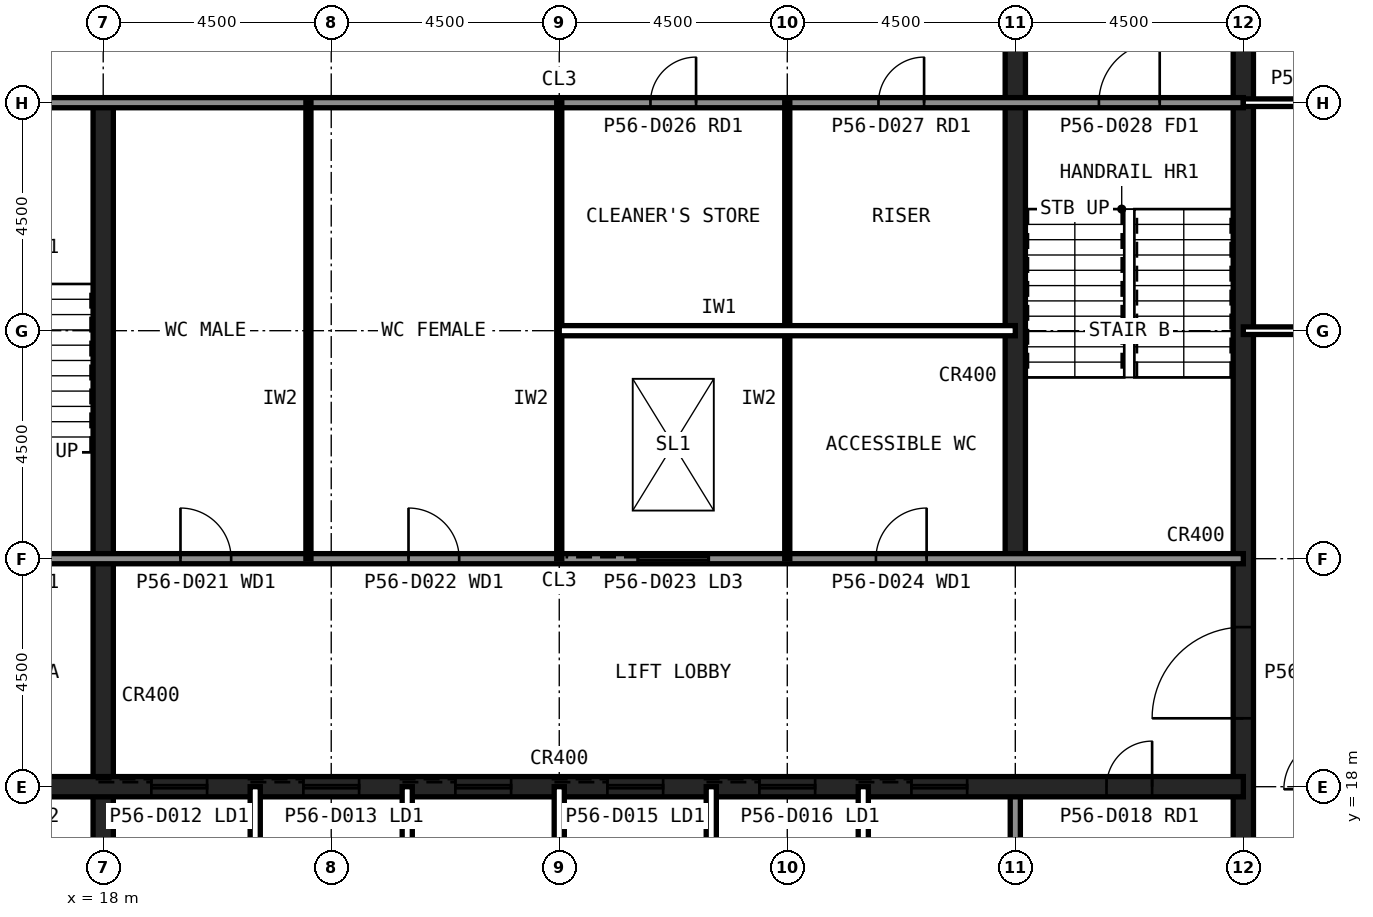
"""IFC4 building model, lengths in metres.
Left out: names, types, materials, properties, quantities, classifications, styles, units other than length and angle.
Written with IfcOpenShell. Run it as: python <this file> out.ifc"""

import sys

from ifc_helpers import new_model, si_unit, direction, frame, frame_2d, origin, place, context, subcontext, project, spatial, rectangle, extrude, element, fill, save


model = new_model("IFC4")
c1 = context("Model", 3, precision=1e-05, world=origin(), true_north=direction((0.0, 1.0)))
c2 = subcontext(c1, "Body", "Model", "MODEL_VIEW")
j1 = project(units=[si_unit("LENGTHUNIT", "METRE"), si_unit("PLANEANGLEUNIT", "RADIAN")], contexts=[c1])
p1 = place(None, origin())
s1 = spatial("IfcSite", under=j1, at=p1, CompositionType="ELEMENT")
p2 = place(p1, origin())
s2 = spatial("IfcBuilding", under=s1, at=p2, CompositionType="ELEMENT")
p3 = place(p2, frame((0.0, 0.0, 238.6)))
s3 = spatial("IfcBuildingStorey", under=s2, at=p3, CompositionType="ELEMENT", Elevation=238.6)
p4 = place(p3, frame((40.5, 13.5, 0.0), z_axis=(0.0, 0.0, 1.0), x_axis=(0.0, 1.0, 0.0)))
e1 = element("IfcWall", 1, at=p4, inside=s3, PredefinedType="SHEAR", context=c2, shape_type="SweptSolid", body=[
    extrude(rectangle(XDim=27.0, YDim=0.4, at=frame_2d((13.5, 0.0))), origin(), (0.0, 0.0, 1.0), 4.0),
])
p5 = place(p4, frame((5.85, 0.0, 0.0)))
e2 = element("IfcOpeningElement", 2, at=p5, cuts=e1, PredefinedType="OPENING", context=c2, shape_type="SweptSolid", body=[
    extrude(rectangle(XDim=1.8, YDim=2.1, at=frame_2d((0.9, 1.05))), frame((0.0, 0.21, 0.0), z_axis=(0.0, -1.0, 0.0), x_axis=(1.0, 0.0, 0.0)), (0.0, 0.0, 1.0), 0.42),
])
p6 = place(p4, frame((19.65, 0.0, 0.0)))
e3 = element("IfcOpeningElement", 3, at=p6, cuts=e1, PredefinedType="OPENING", context=c2, shape_type="SweptSolid", body=[
    extrude(rectangle(XDim=1.2, YDim=2.1, at=frame_2d((0.6, 1.05))), frame((0.0, 0.21, 0.0), z_axis=(0.0, -1.0, 0.0), x_axis=(1.0, 0.0, 0.0)), (0.0, 0.0, 1.0), 0.42),
])
p7 = place(p3, frame((18.0, 13.5, 0.0), z_axis=(0.0, 0.0, 1.0), x_axis=(0.0, 1.0, 0.0)))
e4 = element("IfcWall", 4, at=p7, inside=s3, PredefinedType="SHEAR", context=c2, shape_type="SweptSolid", body=[
    extrude(rectangle(XDim=18.0, YDim=0.4, at=frame_2d((9.0, 0.0))), origin(), (0.0, 0.0, 1.0), 4.0),
])
p8 = place(p3, frame((36.0, 13.5, 0.0), z_axis=(0.0, 0.0, 1.0), x_axis=(0.0, 1.0, 0.0)))
e5 = element("IfcWall", 5, at=p8, inside=s3, PredefinedType="SOLIDWALL", context=c2, shape_type="SweptSolid", body=[
    extrude(rectangle(XDim=4.5, YDim=0.2, at=frame_2d((2.25, 0.0))), origin(), (0.0, 0.0, 1.0), 3.84),
])
p9 = place(p3, frame((36.0, 22.5, 0.0), z_axis=(0.0, 0.0, 1.0), x_axis=(0.0, 1.0, 0.0)))
e6 = element("IfcWall", 6, at=p9, inside=s3, PredefinedType="SHEAR", context=c2, shape_type="SweptSolid", body=[
    extrude(rectangle(XDim=18.0, YDim=0.4, at=frame_2d((9.0, 0.0))), origin(), (0.0, 0.0, 1.0), 4.0),
])
p10 = place(p3, frame((13.5, 18.0, 0.0), z_axis=(0.0, 0.0, 1.0), x_axis=(1.0, 0.0, 0.0)))
e7 = element("IfcWall", 7, at=p10, inside=s3, PredefinedType="SHEAR", context=c2, shape_type="SweptSolid", body=[
    extrude(rectangle(XDim=27.0, YDim=0.4, at=frame_2d((13.5, 0.0))), origin(), (0.0, 0.0, 1.0), 4.0),
])
p11 = place(p10, frame((24.3, 0.0, 0.0)))
e8 = element("IfcOpeningElement", 8, at=p11, cuts=e7, PredefinedType="OPENING", context=c2, shape_type="SweptSolid", body=[
    extrude(rectangle(XDim=0.9, YDim=2.1, at=frame_2d((0.45, 1.05))), frame((0.0, 0.21, 0.0), z_axis=(0.0, -1.0, 0.0), x_axis=(1.0, 0.0, 0.0)), (0.0, 0.0, 1.0), 0.42),
])
p12 = place(p10, frame((5.45, 0.0, 0.0)))
e9 = element("IfcOpeningElement", 9, at=p12, cuts=e7, PredefinedType="OPENING", context=c2, shape_type="SweptSolid", body=[
    extrude(rectangle(XDim=1.1, YDim=2.1, at=frame_2d((0.55, 1.05))), frame((0.0, 0.21, 0.0), z_axis=(0.0, -1.0, 0.0), x_axis=(1.0, 0.0, 0.0)), (0.0, 0.0, 1.0), 0.42),
])
p13 = place(p10, frame((8.45, 0.0, 0.0)))
e10 = element("IfcOpeningElement", 10, at=p13, cuts=e7, PredefinedType="OPENING", context=c2, shape_type="SweptSolid", body=[
    extrude(rectangle(XDim=1.1, YDim=2.1, at=frame_2d((0.55, 1.05))), frame((0.0, 0.21, 0.0), z_axis=(0.0, -1.0, 0.0), x_axis=(1.0, 0.0, 0.0)), (0.0, 0.0, 1.0), 0.42),
])
p14 = place(p10, frame((11.45, 0.0, 0.0)))
e11 = element("IfcOpeningElement", 11, at=p14, cuts=e7, PredefinedType="OPENING", context=c2, shape_type="SweptSolid", body=[
    extrude(rectangle(XDim=1.1, YDim=2.1, at=frame_2d((0.55, 1.05))), frame((0.0, 0.21, 0.0), z_axis=(0.0, -1.0, 0.0), x_axis=(1.0, 0.0, 0.0)), (0.0, 0.0, 1.0), 0.42),
])
p15 = place(p10, frame((14.45, 0.0, 0.0)))
e12 = element("IfcOpeningElement", 12, at=p15, cuts=e7, PredefinedType="OPENING", context=c2, shape_type="SweptSolid", body=[
    extrude(rectangle(XDim=1.1, YDim=2.1, at=frame_2d((0.55, 1.05))), frame((0.0, 0.21, 0.0), z_axis=(0.0, -1.0, 0.0), x_axis=(1.0, 0.0, 0.0)), (0.0, 0.0, 1.0), 0.42),
])
p16 = place(p10, frame((17.45, 0.0, 0.0)))
e13 = element("IfcOpeningElement", 13, at=p16, cuts=e7, PredefinedType="OPENING", context=c2, shape_type="SweptSolid", body=[
    extrude(rectangle(XDim=1.1, YDim=2.1, at=frame_2d((0.55, 1.05))), frame((0.0, 0.21, 0.0), z_axis=(0.0, -1.0, 0.0), x_axis=(1.0, 0.0, 0.0)), (0.0, 0.0, 1.0), 0.42),
])
p17 = place(p10, frame((20.45, 0.0, 0.0)))
e14 = element("IfcOpeningElement", 14, at=p17, cuts=e7, PredefinedType="OPENING", context=c2, shape_type="SweptSolid", body=[
    extrude(rectangle(XDim=1.1, YDim=2.1, at=frame_2d((0.55, 1.05))), frame((0.0, 0.21, 0.0), z_axis=(0.0, -1.0, 0.0), x_axis=(1.0, 0.0, 0.0)), (0.0, 0.0, 1.0), 0.42),
])
p18 = place(p10, frame((1.6, 0.0, 0.0)))
e15 = element("IfcOpeningElement", 15, at=p18, cuts=e7, PredefinedType="OPENING", context=c2, shape_type="SweptSolid", body=[
    extrude(rectangle(XDim=1.3, YDim=2.2, at=frame_2d((0.65, 1.1))), frame((0.0, 0.21, 0.0), z_axis=(0.0, -1.0, 0.0), x_axis=(1.0, 0.0, 0.0)), (0.0, 0.0, 1.0), 0.42),
])
p19 = place(p3, frame((13.5, 22.5, 0.0), z_axis=(0.0, 0.0, 1.0), x_axis=(1.0, 0.0, 0.0)))
e16 = element("IfcWall", 16, at=p19, inside=s3, PredefinedType="SOLIDWALL", context=c2, shape_type="SweptSolid", body=[
    extrude(rectangle(XDim=27.0, YDim=0.2, at=frame_2d((13.5, 0.0))), origin(), (0.0, 0.0, 1.0), 3.84),
])
p20 = place(p19, frame((1.65, 0.0, 0.0)))
e17 = element("IfcOpeningElement", 17, at=p20, cuts=e16, PredefinedType="OPENING", context=c2, shape_type="SweptSolid", body=[
    extrude(rectangle(XDim=1.2, YDim=2.1, at=frame_2d((0.6, 1.05))), frame((0.0, 0.11, 0.0), z_axis=(0.0, -1.0, 0.0), x_axis=(1.0, 0.0, 0.0)), (0.0, 0.0, 1.0), 0.22),
])
p21 = place(p19, frame((6.025, 0.0, 0.0)))
e18 = element("IfcOpeningElement", 18, at=p21, cuts=e16, PredefinedType="OPENING", context=c2, shape_type="SweptSolid", body=[
    extrude(rectangle(XDim=1.0, YDim=2.1, at=frame_2d((0.5, 1.05))), frame((0.0, 0.11, 0.0), z_axis=(0.0, -1.0, 0.0), x_axis=(1.0, 0.0, 0.0)), (0.0, 0.0, 1.0), 0.22),
])
p22 = place(p19, frame((10.525, 0.0, 0.0)))
e19 = element("IfcOpeningElement", 19, at=p22, cuts=e16, PredefinedType="OPENING", context=c2, shape_type="SweptSolid", body=[
    extrude(rectangle(XDim=1.0, YDim=2.1, at=frame_2d((0.5, 1.05))), frame((0.0, 0.11, 0.0), z_axis=(0.0, -1.0, 0.0), x_axis=(1.0, 0.0, 0.0)), (0.0, 0.0, 1.0), 0.22),
])
p23 = place(p19, frame((19.75, 0.0, 0.0)))
e20 = element("IfcOpeningElement", 20, at=p23, cuts=e16, PredefinedType="OPENING", context=c2, shape_type="SweptSolid", body=[
    extrude(rectangle(XDim=1.0, YDim=2.1, at=frame_2d((0.5, 1.05))), frame((0.0, 0.11, 0.0), z_axis=(0.0, -1.0, 0.0), x_axis=(1.0, 0.0, 0.0)), (0.0, 0.0, 1.0), 0.22),
])
p24 = place(p19, frame((15.05, 0.0, 0.0)))
e21 = element("IfcOpeningElement", 21, at=p24, cuts=e16, PredefinedType="OPENING", context=c2, shape_type="SweptSolid", body=[
    extrude(rectangle(XDim=1.4, YDim=2.4, at=frame_2d((0.7, 1.2))), frame((0.0, 0.11, 0.0), z_axis=(0.0, -1.0, 0.0), x_axis=(1.0, 0.0, 0.0)), (0.0, 0.0, 1.0), 0.22),
])
p25 = place(p3, frame((13.5, 31.5, 0.0), z_axis=(0.0, 0.0, 1.0), x_axis=(1.0, 0.0, 0.0)))
e22 = element("IfcWall", 22, at=p25, inside=s3, PredefinedType="SOLIDWALL", context=c2, shape_type="SweptSolid", body=[
    extrude(rectangle(XDim=27.0, YDim=0.2, at=frame_2d((13.5, 0.0))), origin(), (0.0, 0.0, 1.0), 3.84),
])
p26 = place(p25, frame((24.15, 0.0, 0.0)))
e23 = element("IfcOpeningElement", 23, at=p26, cuts=e22, PredefinedType="OPENING", context=c2, shape_type="SweptSolid", body=[
    extrude(rectangle(XDim=1.2, YDim=2.1, at=frame_2d((0.6, 1.05))), frame((0.0, 0.11, 0.0), z_axis=(0.0, -1.0, 0.0), x_axis=(1.0, 0.0, 0.0)), (0.0, 0.0, 1.0), 0.22),
])
p27 = place(p25, frame((15.3, 0.0, 0.0)))
e24 = element("IfcOpeningElement", 24, at=p27, cuts=e22, PredefinedType="OPENING", context=c2, shape_type="SweptSolid", body=[
    extrude(rectangle(XDim=0.9, YDim=2.1, at=frame_2d((0.45, 1.05))), frame((0.0, 0.11, 0.0), z_axis=(0.0, -1.0, 0.0), x_axis=(1.0, 0.0, 0.0)), (0.0, 0.0, 1.0), 0.22),
])
p28 = place(p25, frame((19.8, 0.0, 0.0)))
e25 = element("IfcOpeningElement", 25, at=p28, cuts=e22, PredefinedType="OPENING", context=c2, shape_type="SweptSolid", body=[
    extrude(rectangle(XDim=0.9, YDim=2.1, at=frame_2d((0.45, 1.05))), frame((0.0, 0.11, 0.0), z_axis=(0.0, -1.0, 0.0), x_axis=(1.0, 0.0, 0.0)), (0.0, 0.0, 1.0), 0.22),
])
for number, where, z_axis, x_axis in (
    (26, (21.0, 13.5, 0.0), (0.0, 0.0, 1.0), (0.0, 1.0, 0.0)),
    (27, (24.0, 13.5, 0.0), (0.0, 0.0, 1.0), (0.0, 1.0, 0.0)),
    (28, (27.0, 13.5, 0.0), (0.0, 0.0, 1.0), (0.0, 1.0, 0.0)),
    (29, (30.0, 13.5, 0.0), (0.0, 0.0, 1.0), (0.0, 1.0, 0.0)),
    (30, (33.0, 13.5, 0.0), (0.0, 0.0, 1.0), (0.0, 1.0, 0.0)),
):
    element("IfcWall", number, at=place(p3, frame(where, z_axis=z_axis, x_axis=x_axis)), inside=s3, PredefinedType="PARTITIONING", context=c2, shape_type="SweptSolid", body=[
        extrude(rectangle(XDim=4.5, YDim=0.2, at=frame_2d((2.25, 0.0))), origin(), (0.0, 0.0, 1.0), 3.84),
    ])
for number, where, z_axis, x_axis in (
    (31, (22.05, 22.5, 0.0), (0.0, 0.0, 1.0), (0.0, 1.0, 0.0)),
    (32, (27.0, 22.5, 0.0), (0.0, 0.0, 1.0), (0.0, 1.0, 0.0)),
    (33, (31.5, 22.5, 0.0), (0.0, 0.0, 1.0), (0.0, 1.0, 0.0)),
):
    element("IfcWall", number, at=place(p3, frame(where, z_axis=z_axis, x_axis=x_axis)), inside=s3, PredefinedType="PLUMBINGWALL", context=c2, shape_type="SweptSolid", body=[
        extrude(rectangle(XDim=9.0, YDim=0.1, at=frame_2d((4.5, 0.0))), origin(), (0.0, 0.0, 1.0), 3.84),
    ])
p29 = place(p3, frame((27.0, 27.0, 0.0), z_axis=(0.0, 0.0, 1.0), x_axis=(1.0, 0.0, 0.0)))
e34 = element("IfcWall", 34, at=p29, inside=s3, PredefinedType="PARTITIONING", context=c2, shape_type="SweptSolid", body=[
    extrude(rectangle(XDim=9.0, YDim=0.2, at=frame_2d((4.5, 0.0))), origin(), (0.0, 0.0, 1.0), 3.84),
])
p30 = place(p3, frame((40.5, 27.0, 0.0), z_axis=(0.0, 0.0, 1.0), x_axis=(1.0, 0.0, 0.0)))
e35 = element("IfcWall", 35, at=p30, inside=s3, PredefinedType="PARTITIONING", context=c2, shape_type="SweptSolid", body=[
    extrude(rectangle(XDim=13.165, YDim=0.15, at=frame_2d((6.583, 0.0))), origin(), (0.0, 0.0, 1.0), 2.989),
])
p31 = place(p3, frame((44.1, 31.5, 0.0), z_axis=(0.0, 0.0, 1.0), x_axis=(-1.0, 0.0, 0.0)))
e36 = element("IfcWall", 36, at=p31, inside=s3, PredefinedType="PARTITIONING", context=c2, shape_type="SweptSolid", body=[
    extrude(rectangle(XDim=3.6, YDim=0.15, at=frame_2d((1.8, 0.0))), origin(), (0.0, 0.0, 1.0), 2.989),
])
p32 = place(p31, frame((1.3, 0.0, 0.0)))
e37 = element("IfcOpeningElement", 37, at=p32, cuts=e36, PredefinedType="OPENING", context=c2, shape_type="SweptSolid", body=[
    extrude(rectangle(XDim=1.0, YDim=2.1, at=frame_2d((0.5, 1.05))), frame((0.0, 0.085, 0.0), z_axis=(0.0, -1.0, 0.0), x_axis=(1.0, 0.0, 0.0)), (0.0, 0.0, 1.0), 0.17),
])
p33 = place(p5, origin())
e38 = element("IfcDoor", 38, at=p33, inside=s3, OperationType="SINGLE_SWING_LEFT", PredefinedType="DOOR", context=c2, shape_type="SweptSolid", body=[
    extrude(rectangle(XDim=1.8, YDim=2.1, at=frame_2d((0.9, 1.05))), frame((0.0, 0.025, 0.0), z_axis=(0.0, -1.0, 0.0), x_axis=(1.0, 0.0, 0.0)), (0.0, 0.0, 1.0), 0.05),
])
fill(e2, e38)
p34 = place(p26, origin())
e39 = element("IfcDoor", 39, at=p34, inside=s3, OperationType="SINGLE_SWING_RIGHT", PredefinedType="DOOR", context=c2, shape_type="SweptSolid", body=[
    extrude(rectangle(XDim=1.2, YDim=2.1, at=frame_2d((0.6, 1.05))), frame((0.0, 0.025, 0.0), z_axis=(0.0, -1.0, 0.0), x_axis=(1.0, 0.0, 0.0)), (0.0, 0.0, 1.0), 0.05),
])
fill(e23, e39)
p35 = place(p21, origin())
e40 = element("IfcDoor", 40, at=p35, inside=s3, OperationType="SINGLE_SWING_LEFT", PredefinedType="DOOR", context=c2, shape_type="SweptSolid", body=[
    extrude(rectangle(XDim=1.0, YDim=2.1, at=frame_2d((0.5, 1.05))), frame((0.0, 0.025, 0.0), z_axis=(0.0, -1.0, 0.0), x_axis=(1.0, 0.0, 0.0)), (0.0, 0.0, 1.0), 0.05),
])
fill(e18, e40)
p36 = place(p22, origin())
e41 = element("IfcDoor", 41, at=p36, inside=s3, OperationType="SINGLE_SWING_LEFT", PredefinedType="DOOR", context=c2, shape_type="SweptSolid", body=[
    extrude(rectangle(XDim=1.0, YDim=2.1, at=frame_2d((0.5, 1.05))), frame((0.0, 0.025, 0.0), z_axis=(0.0, -1.0, 0.0), x_axis=(1.0, 0.0, 0.0)), (0.0, 0.0, 1.0), 0.05),
])
fill(e19, e41)
p37 = place(p23, origin())
e42 = element("IfcDoor", 42, at=p37, inside=s3, OperationType="SINGLE_SWING_RIGHT", PredefinedType="DOOR", context=c2, shape_type="SweptSolid", body=[
    extrude(rectangle(XDim=1.0, YDim=2.1, at=frame_2d((0.5, 1.05))), frame((0.0, 0.025, 0.0), z_axis=(0.0, -1.0, 0.0), x_axis=(1.0, 0.0, 0.0)), (0.0, 0.0, 1.0), 0.05),
])
fill(e20, e42)
p38 = place(p27, origin())
e43 = element("IfcDoor", 43, at=p38, inside=s3, OperationType="SINGLE_SWING_RIGHT", PredefinedType="DOOR", context=c2, shape_type="SweptSolid", body=[
    extrude(rectangle(XDim=0.9, YDim=2.1, at=frame_2d((0.45, 1.05))), frame((0.0, 0.025, 0.0), z_axis=(0.0, -1.0, 0.0), x_axis=(1.0, 0.0, 0.0)), (0.0, 0.0, 1.0), 0.05),
])
fill(e24, e43)
p39 = place(p28, origin())
e44 = element("IfcDoor", 44, at=p39, inside=s3, OperationType="SINGLE_SWING_RIGHT", PredefinedType="DOOR", context=c2, shape_type="SweptSolid", body=[
    extrude(rectangle(XDim=0.9, YDim=2.1, at=frame_2d((0.45, 1.05))), frame((0.0, 0.025, 0.0), z_axis=(0.0, -1.0, 0.0), x_axis=(1.0, 0.0, 0.0)), (0.0, 0.0, 1.0), 0.05),
])
fill(e25, e44)
p40 = place(p11, origin())
e45 = element("IfcDoor", 45, at=p40, inside=s3, OperationType="SINGLE_SWING_RIGHT", PredefinedType="DOOR", context=c2, shape_type="SweptSolid", body=[
    extrude(rectangle(XDim=0.9, YDim=2.1, at=frame_2d((0.45, 1.05))), frame((0.0, 0.025, 0.0), z_axis=(0.0, -1.0, 0.0), x_axis=(1.0, 0.0, 0.0)), (0.0, 0.0, 1.0), 0.05),
])
fill(e8, e45)
p41 = place(p12, origin())
e46 = element("IfcDoor", 46, at=p41, inside=s3, OperationType="SLIDING_TO_LEFT", PredefinedType="DOOR", context=c2, shape_type="SweptSolid", body=[
    extrude(rectangle(XDim=1.1, YDim=2.1, at=frame_2d((0.55, 1.05))), frame((0.0, 0.025, 0.0), z_axis=(0.0, -1.0, 0.0), x_axis=(1.0, 0.0, 0.0)), (0.0, 0.0, 1.0), 0.05),
])
fill(e9, e46)
p42 = place(p13, origin())
e47 = element("IfcDoor", 47, at=p42, inside=s3, OperationType="SLIDING_TO_LEFT", PredefinedType="DOOR", context=c2, shape_type="SweptSolid", body=[
    extrude(rectangle(XDim=1.1, YDim=2.1, at=frame_2d((0.55, 1.05))), frame((0.0, 0.025, 0.0), z_axis=(0.0, -1.0, 0.0), x_axis=(1.0, 0.0, 0.0)), (0.0, 0.0, 1.0), 0.05),
])
fill(e10, e47)
p43 = place(p14, origin())
e48 = element("IfcDoor", 48, at=p43, inside=s3, OperationType="SLIDING_TO_LEFT", PredefinedType="DOOR", context=c2, shape_type="SweptSolid", body=[
    extrude(rectangle(XDim=1.1, YDim=2.1, at=frame_2d((0.55, 1.05))), frame((0.0, 0.025, 0.0), z_axis=(0.0, -1.0, 0.0), x_axis=(1.0, 0.0, 0.0)), (0.0, 0.0, 1.0), 0.05),
])
fill(e11, e48)
p44 = place(p15, origin())
e49 = element("IfcDoor", 49, at=p44, inside=s3, OperationType="SLIDING_TO_LEFT", PredefinedType="DOOR", context=c2, shape_type="SweptSolid", body=[
    extrude(rectangle(XDim=1.1, YDim=2.1, at=frame_2d((0.55, 1.05))), frame((0.0, 0.025, 0.0), z_axis=(0.0, -1.0, 0.0), x_axis=(1.0, 0.0, 0.0)), (0.0, 0.0, 1.0), 0.05),
])
fill(e12, e49)
p45 = place(p16, origin())
e50 = element("IfcDoor", 50, at=p45, inside=s3, OperationType="SLIDING_TO_LEFT", PredefinedType="DOOR", context=c2, shape_type="SweptSolid", body=[
    extrude(rectangle(XDim=1.1, YDim=2.1, at=frame_2d((0.55, 1.05))), frame((0.0, 0.025, 0.0), z_axis=(0.0, -1.0, 0.0), x_axis=(1.0, 0.0, 0.0)), (0.0, 0.0, 1.0), 0.05),
])
fill(e13, e50)
p46 = place(p17, origin())
e51 = element("IfcDoor", 51, at=p46, inside=s3, OperationType="SLIDING_TO_LEFT", PredefinedType="DOOR", context=c2, shape_type="SweptSolid", body=[
    extrude(rectangle(XDim=1.1, YDim=2.1, at=frame_2d((0.55, 1.05))), frame((0.0, 0.025, 0.0), z_axis=(0.0, -1.0, 0.0), x_axis=(1.0, 0.0, 0.0)), (0.0, 0.0, 1.0), 0.05),
])
fill(e14, e51)
p47 = place(p24, origin())
e52 = element("IfcDoor", 52, at=p47, inside=s3, OperationType="SLIDING_TO_LEFT", PredefinedType="DOOR", context=c2, shape_type="SweptSolid", body=[
    extrude(rectangle(XDim=1.4, YDim=2.4, at=frame_2d((0.7, 1.2))), frame((0.0, 0.025, 0.0), z_axis=(0.0, -1.0, 0.0), x_axis=(1.0, 0.0, 0.0)), (0.0, 0.0, 1.0), 0.05),
])
fill(e21, e52)
save(model, sys.argv[1])
